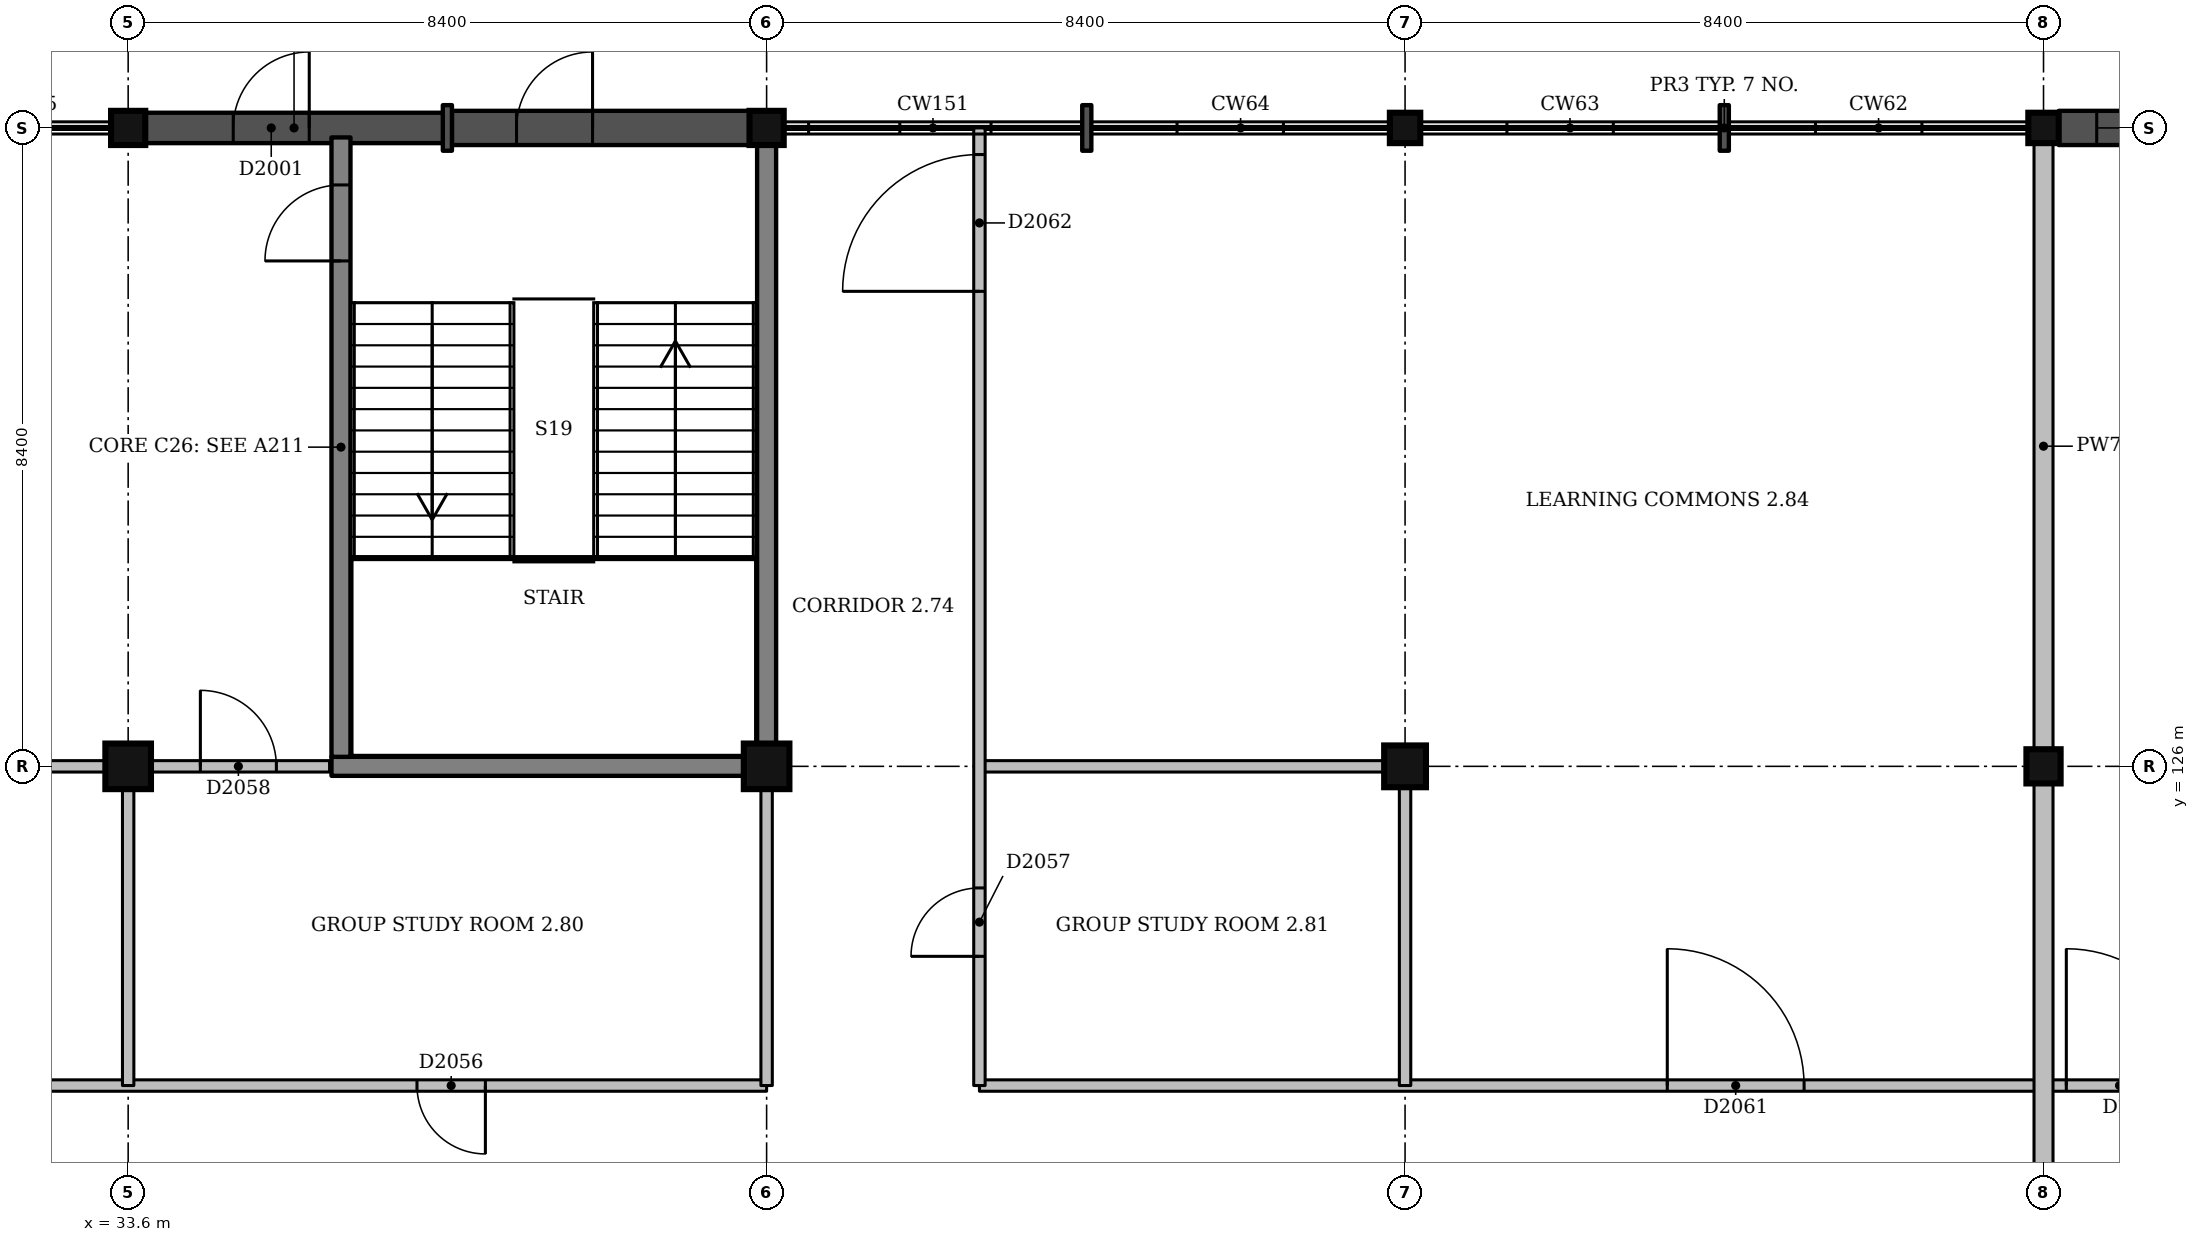
"""IFC4 building model, lengths in metres.
Left out: names, types, materials, properties, quantities, classifications, styles, units other than length and angle.
Written with IfcOpenShell. Run it as: python <this file> out.ifc"""

import sys

from ifc_helpers import new_model, si_unit, direction, frame, frame_2d, origin, origin_2d, place, context, subcontext, project, spatial, rectangle, extrude, element, fill, save


model = new_model("IFC4")
c1 = context("Model", 3, precision=1e-05, world=origin(), true_north=direction((0.0, 1.0)))
c2 = subcontext(c1, "Body", "Model", "MODEL_VIEW")
j1 = project(units=[si_unit("LENGTHUNIT", "METRE"), si_unit("PLANEANGLEUNIT", "RADIAN")], contexts=[c1])
p1 = place(None, origin())
s1 = spatial("IfcSite", under=j1, at=p1, CompositionType="ELEMENT")
p2 = place(p1, origin())
s2 = spatial("IfcBuilding", under=s1, at=p2, CompositionType="ELEMENT")
p3 = place(p2, frame((0.0, 0.0, 9.0)))
s3 = spatial("IfcBuildingStorey", under=s2, at=p3, CompositionType="ELEMENT", Elevation=9.0)
p4 = place(p3, frame((33.6, 126.0, -1.5), z_axis=(0.0, 0.0, 1.0), x_axis=(1.0, 0.0, 0.0)))
e1 = element("IfcColumn", 1, at=p4, inside=s3, PredefinedType="COLUMN", context=c2, shape_type="SweptSolid", body=[
    extrude(rectangle(XDim=0.6, YDim=0.6, at=origin_2d()), origin(), (0.0, 0.0, 1.0), 6.0),
])
p5 = place(p3, frame((33.6, 134.4, -1.5), z_axis=(0.0, 0.0, 1.0), x_axis=(1.0, 0.0, 0.0)))
e2 = element("IfcColumn", 2, at=p5, inside=s3, PredefinedType="COLUMN", context=c2, shape_type="SweptSolid", body=[
    extrude(rectangle(XDim=0.45, YDim=0.45, at=origin_2d()), origin(), (0.0, 0.0, 1.0), 6.0),
])
p6 = place(p3, frame((42.0, 126.0, -1.5), z_axis=(0.0, 0.0, 1.0), x_axis=(1.0, 0.0, 0.0)))
e3 = element("IfcColumn", 3, at=p6, inside=s3, PredefinedType="COLUMN", context=c2, shape_type="SweptSolid", body=[
    extrude(rectangle(XDim=0.6, YDim=0.6, at=origin_2d()), origin(), (0.0, 0.0, 1.0), 6.0),
])
p7 = place(p3, frame((42.0, 134.4, -1.5), z_axis=(0.0, 0.0, 1.0), x_axis=(1.0, 0.0, 0.0)))
e4 = element("IfcColumn", 4, at=p7, inside=s3, PredefinedType="COLUMN", context=c2, shape_type="SweptSolid", body=[
    extrude(rectangle(XDim=0.45, YDim=0.45, at=origin_2d()), origin(), (0.0, 0.0, 1.0), 6.0),
])
p8 = place(p3, frame((50.4, 126.0, -1.5), z_axis=(0.0, 0.0, 1.0), x_axis=(1.0, 0.0, 0.0)))
e5 = element("IfcColumn", 5, at=p8, inside=s3, PredefinedType="COLUMN", context=c2, shape_type="SweptSolid", body=[
    extrude(rectangle(XDim=0.55, YDim=0.55, at=origin_2d()), origin(), (0.0, 0.0, 1.0), 6.0),
])
p9 = place(p3, frame((50.4, 134.4, -1.5), z_axis=(0.0, 0.0, 1.0), x_axis=(1.0, 0.0, 0.0)))
e6 = element("IfcColumn", 6, at=p9, inside=s3, PredefinedType="COLUMN", context=c2, shape_type="SweptSolid", body=[
    extrude(rectangle(XDim=0.4, YDim=0.4, at=origin_2d()), origin(), (0.0, 0.0, 1.0), 6.0),
])
p10 = place(p3, frame((58.8, 126.0, -1.5), z_axis=(0.0, 0.0, 1.0), x_axis=(1.0, 0.0, 0.0)))
e7 = element("IfcColumn", 7, at=p10, inside=s3, PredefinedType="COLUMN", context=c2, shape_type="SweptSolid", body=[
    extrude(rectangle(XDim=0.45, YDim=0.45, at=origin_2d()), origin(), (0.0, 0.0, 1.0), 6.0),
])
p11 = place(p3, frame((58.8, 134.4, -1.5), z_axis=(0.0, 0.0, 1.0), x_axis=(1.0, 0.0, 0.0)))
e8 = element("IfcColumn", 8, at=p11, inside=s3, PredefinedType="COLUMN", context=c2, shape_type="SweptSolid", body=[
    extrude(rectangle(XDim=0.4, YDim=0.4, at=origin_2d()), origin(), (0.0, 0.0, 1.0), 6.0),
])
p12 = place(p3, frame((36.275, 126.0, 0.0), z_axis=(0.0, 0.0, 1.0), x_axis=(1.0, 0.0, 0.0)))
e9 = element("IfcWall", 9, at=p12, inside=s3, PredefinedType="SHEAR", context=c2, shape_type="SweptSolid", body=[
    extrude(rectangle(XDim=5.425, YDim=0.25, at=frame_2d((2.712, 0.0))), origin(), (0.0, 0.0, 1.0), 4.5),
])
p13 = place(p3, frame((36.4, 126.125, 0.0), z_axis=(0.0, 0.0, 1.0), x_axis=(0.0, 1.0, 0.0)))
e10 = element("IfcWall", 10, at=p13, inside=s3, PredefinedType="SHEAR", context=c2, shape_type="SweptSolid", body=[
    extrude(rectangle(XDim=8.15, YDim=0.25, at=frame_2d((4.075, 0.0))), origin(), (0.0, 0.0, 1.0), 4.5),
])
p14 = place(p13, frame((6.525, 0.0, 0.0)))
e11 = element("IfcOpeningElement", 11, at=p14, cuts=e10, PredefinedType="OPENING", context=c2, shape_type="SweptSolid", body=[
    extrude(rectangle(XDim=1.0, YDim=2.1, at=frame_2d((0.5, 1.05))), frame((0.0, 0.135, 0.0), z_axis=(0.0, -1.0, 0.0), x_axis=(1.0, 0.0, 0.0)), (0.0, 0.0, 1.0), 0.27),
])
p15 = place(p3, frame((42.0, 126.3, 0.0), z_axis=(0.0, 0.0, 1.0), x_axis=(0.0, 1.0, 0.0)))
e12 = element("IfcWall", 12, at=p15, inside=s3, PredefinedType="SHEAR", context=c2, shape_type="SweptSolid", body=[
    extrude(rectangle(XDim=7.875, YDim=0.25, at=frame_2d((3.938, 0.0))), origin(), (0.0, 0.0, 1.0), 4.5),
])
for number, where, z_axis, x_axis in (
    (13, (54.66, 134.4, 0.0), (0.0, 0.0, 1.0), (-1.0, 0.0, 0.0)),
    (14, (46.272, 134.4, 0.0), (0.0, 0.0, 1.0), (-1.0, 0.0, 0.0)),
):
    element("IfcWall", number, at=place(p3, frame(where, z_axis=z_axis, x_axis=x_axis)), inside=s3, PredefinedType="SOLIDWALL", context=c2, shape_type="SweptSolid", body=[
        extrude(rectangle(XDim=0.12, YDim=0.6, at=frame_2d((0.06, 0.0))), origin(), (0.0, 0.0, 1.0), 3.35),
    ])
p16 = place(p3, frame((41.775, 134.4, 0.0), z_axis=(0.0, 0.0, 1.0), x_axis=(-1.0, 0.0, 0.0)))
e15 = element("IfcWall", 15, at=p16, inside=s3, PredefinedType="SOLIDWALL", context=c2, shape_type="SweptSolid", body=[
    extrude(rectangle(XDim=3.915, YDim=0.45, at=frame_2d((1.958, 0.0))), origin(), (0.0, 0.0, 1.0), 3.35),
])
p17 = place(p16, frame((3.065, 0.0, 0.0), z_axis=(0.0, 0.0, 1.0), x_axis=(-1.0, 0.0, 0.0)))
e16 = element("IfcOpeningElement", 16, at=p17, cuts=e15, PredefinedType="OPENING", context=c2, shape_type="SweptSolid", body=[
    extrude(rectangle(XDim=1.0, YDim=2.1, at=frame_2d((0.5, 1.05))), frame((0.0, 0.235, 0.0), z_axis=(0.0, -1.0, 0.0), x_axis=(1.0, 0.0, 0.0)), (0.0, 0.0, 1.0), 0.47),
])
p18 = place(p3, frame((37.86, 134.4, 0.0), z_axis=(0.0, 0.0, 1.0), x_axis=(-1.0, 0.0, 0.0)))
e17 = element("IfcWall", 17, at=p18, inside=s3, PredefinedType="SOLIDWALL", context=c2, shape_type="SweptSolid", body=[
    extrude(rectangle(XDim=0.12, YDim=0.6, at=frame_2d((0.06, 0.0))), origin(), (0.0, 0.0, 1.0), 3.35),
])
p19 = place(p3, frame((37.74, 134.4, 0.0), z_axis=(0.0, 0.0, 1.0), x_axis=(-1.0, 0.0, 0.0)))
e18 = element("IfcWall", 18, at=p19, inside=s3, PredefinedType="SOLIDWALL", context=c2, shape_type="SweptSolid", body=[
    extrude(rectangle(XDim=3.915, YDim=0.4, at=frame_2d((1.958, 0.0))), origin(), (0.0, 0.0, 1.0), 3.35),
])
p20 = place(p19, frame((1.758, 0.0, 0.0)))
e19 = element("IfcOpeningElement", 19, at=p20, cuts=e18, PredefinedType="OPENING", context=c2, shape_type="SweptSolid", body=[
    extrude(rectangle(XDim=1.0, YDim=2.1, at=frame_2d((0.5, 1.05))), frame((0.0, 0.21, 0.0), z_axis=(0.0, -1.0, 0.0), x_axis=(1.0, 0.0, 0.0)), (0.0, 0.0, 1.0), 0.42),
])
p21 = place(p3, frame((62.7, 134.4, 0.0), z_axis=(0.0, 0.0, 1.0), x_axis=(-1.0, 0.0, 0.0)))
e20 = element("IfcWall", 20, at=p21, inside=s3, PredefinedType="SOLIDWALL", context=c2, shape_type="SweptSolid", body=[
    extrude(rectangle(XDim=3.7, YDim=0.45, at=frame_2d((1.85, 0.0))), origin(), (0.0, 0.0, 1.0), 3.45),
])
p22 = place(p21, frame((0.5, 0.0, 0.6)))
e21 = element("IfcOpeningElement", 21, at=p22, cuts=e20, PredefinedType="OPENING", context=c2, shape_type="SweptSolid", body=[
    extrude(rectangle(XDim=2.7, YDim=2.4, at=frame_2d((1.35, 1.2))), frame((0.0, 0.235, 0.0), z_axis=(0.0, -1.0, 0.0), x_axis=(1.0, 0.0, 0.0)), (0.0, 0.0, 1.0), 0.47),
])
p23 = place(p3, frame((16.8, 121.8, 0.0), z_axis=(0.0, 0.0, 1.0), x_axis=(1.0, 0.0, 0.0)))
e22 = element("IfcWall", 22, at=p23, inside=s3, PredefinedType="PARTITIONING", context=c2, shape_type="SweptSolid", body=[
    extrude(rectangle(XDim=25.2, YDim=0.15, at=frame_2d((12.6, 0.0))), origin(), (0.0, 0.0, 1.0), 3.4),
])
p24 = place(p23, frame((3.8, 0.0, 0.0)))
e23 = element("IfcOpeningElement", 23, at=p24, cuts=e22, PredefinedType="OPENING", context=c2, shape_type="SweptSolid", body=[
    extrude(rectangle(XDim=0.9, YDim=2.1, at=frame_2d((0.45, 1.05))), frame((0.0, 0.085, 0.0), z_axis=(0.0, -1.0, 0.0), x_axis=(1.0, 0.0, 0.0)), (0.0, 0.0, 1.0), 0.17),
])
p25 = place(p23, frame((12.2, 0.0, 0.0)))
e24 = element("IfcOpeningElement", 24, at=p25, cuts=e22, PredefinedType="OPENING", context=c2, shape_type="SweptSolid", body=[
    extrude(rectangle(XDim=0.9, YDim=2.1, at=frame_2d((0.45, 1.05))), frame((0.0, 0.085, 0.0), z_axis=(0.0, -1.0, 0.0), x_axis=(1.0, 0.0, 0.0)), (0.0, 0.0, 1.0), 0.17),
])
p26 = place(p23, frame((20.6, 0.0, 0.0)))
e25 = element("IfcOpeningElement", 25, at=p26, cuts=e22, PredefinedType="OPENING", context=c2, shape_type="SweptSolid", body=[
    extrude(rectangle(XDim=0.9, YDim=2.1, at=frame_2d((0.45, 1.05))), frame((0.0, 0.085, 0.0), z_axis=(0.0, -1.0, 0.0), x_axis=(1.0, 0.0, 0.0)), (0.0, 0.0, 1.0), 0.17),
])
p27 = place(p3, frame((44.8, 121.8, 0.0), z_axis=(0.0, 0.0, 1.0), x_axis=(1.0, 0.0, 0.0)))
e26 = element("IfcWall", 26, at=p27, inside=s3, PredefinedType="PARTITIONING", context=c2, shape_type="SweptSolid", body=[
    extrude(rectangle(XDim=30.0, YDim=0.15, at=frame_2d((15.0, 0.0))), origin(), (0.0, 0.0, 1.0), 3.35),
])
p28 = place(p27, frame((9.05, 0.0, 0.0)))
e27 = element("IfcOpeningElement", 27, at=p28, cuts=e26, PredefinedType="OPENING", context=c2, shape_type="SweptSolid", body=[
    extrude(rectangle(XDim=1.8, YDim=2.1, at=frame_2d((0.9, 1.05))), frame((0.0, 0.085, 0.0), z_axis=(0.0, -1.0, 0.0), x_axis=(1.0, 0.0, 0.0)), (0.0, 0.0, 1.0), 0.17),
])
p29 = place(p27, frame((14.3, 0.0, 0.0)))
e28 = element("IfcOpeningElement", 28, at=p29, cuts=e26, PredefinedType="OPENING", context=c2, shape_type="SweptSolid", body=[
    extrude(rectangle(XDim=1.8, YDim=2.1, at=frame_2d((0.9, 1.05))), frame((0.0, 0.085, 0.0), z_axis=(0.0, -1.0, 0.0), x_axis=(1.0, 0.0, 0.0)), (0.0, 0.0, 1.0), 0.17),
])
p30 = place(p3, frame((25.5, 126.0, 0.0), z_axis=(0.0, 0.0, 1.0), x_axis=(1.0, 0.0, 0.0)))
e29 = element("IfcWall", 29, at=p30, inside=s3, PredefinedType="PARTITIONING", context=c2, shape_type="SweptSolid", body=[
    extrude(rectangle(XDim=7.8, YDim=0.15, at=frame_2d((3.9, 0.0))), origin(), (0.0, 0.0, 1.0), 3.4),
])
p31 = place(p3, frame((33.9, 126.0, 0.0), z_axis=(0.0, 0.0, 1.0), x_axis=(1.0, 0.0, 0.0)))
e30 = element("IfcWall", 30, at=p31, inside=s3, PredefinedType="PARTITIONING", context=c2, shape_type="SweptSolid", body=[
    extrude(rectangle(XDim=2.35, YDim=0.15, at=frame_2d((1.175, 0.0))), origin(), (0.0, 0.0, 1.0), 3.4),
])
p32 = place(p31, frame((0.65, 0.0, 0.0)))
e31 = element("IfcOpeningElement", 31, at=p32, cuts=e30, PredefinedType="OPENING", context=c2, shape_type="SweptSolid", body=[
    extrude(rectangle(XDim=1.0, YDim=2.1, at=frame_2d((0.5, 1.05))), frame((0.0, 0.085, 0.0), z_axis=(0.0, -1.0, 0.0), x_axis=(1.0, 0.0, 0.0)), (0.0, 0.0, 1.0), 0.17),
])
p33 = place(p3, frame((44.8, 126.0, 0.0), z_axis=(0.0, 0.0, 1.0), x_axis=(1.0, 0.0, 0.0)))
e32 = element("IfcWall", 32, at=p33, inside=s3, PredefinedType="PARTITIONING", context=c2, shape_type="SweptSolid", body=[
    extrude(rectangle(XDim=5.325, YDim=0.15, at=frame_2d((2.663, 0.0))), origin(), (0.0, 0.0, 1.0), 3.4),
])
p34 = place(p3, frame((33.6, 121.8, 0.0), z_axis=(0.0, 0.0, 1.0), x_axis=(0.0, 1.0, 0.0)))
e33 = element("IfcWall", 33, at=p34, inside=s3, PredefinedType="PARTITIONING", context=c2, shape_type="SweptSolid", body=[
    extrude(rectangle(XDim=3.9, YDim=0.15, at=frame_2d((1.95, 0.0))), origin(), (0.0, 0.0, 1.0), 4.15),
])
p35 = place(p3, frame((42.0, 121.8, 0.0), z_axis=(0.0, 0.0, 1.0), x_axis=(0.0, 1.0, 0.0)))
e34 = element("IfcWall", 34, at=p35, inside=s3, PredefinedType="PARTITIONING", context=c2, shape_type="SweptSolid", body=[
    extrude(rectangle(XDim=3.9, YDim=0.15, at=frame_2d((1.95, 0.0))), origin(), (0.0, 0.0, 1.0), 3.4),
])
p36 = place(p3, frame((44.8, 121.8, 0.0), z_axis=(0.0, 0.0, 1.0), x_axis=(0.0, 1.0, 0.0)))
e35 = element("IfcWall", 35, at=p36, inside=s3, PredefinedType="PARTITIONING", context=c2, shape_type="SweptSolid", body=[
    extrude(rectangle(XDim=12.6, YDim=0.15, at=frame_2d((6.3, 0.0))), origin(), (0.0, 0.0, 1.0), 3.27),
])
p37 = place(p36, frame((1.7, 0.0, 0.0)))
e36 = element("IfcOpeningElement", 36, at=p37, cuts=e35, PredefinedType="OPENING", context=c2, shape_type="SweptSolid", body=[
    extrude(rectangle(XDim=0.9, YDim=2.1, at=frame_2d((0.45, 1.05))), frame((0.0, 0.085, 0.0), z_axis=(0.0, -1.0, 0.0), x_axis=(1.0, 0.0, 0.0)), (0.0, 0.0, 1.0), 0.17),
])
p38 = place(p36, frame((10.45, 0.0, 0.0)))
e37 = element("IfcOpeningElement", 37, at=p38, cuts=e35, PredefinedType="OPENING", context=c2, shape_type="SweptSolid", body=[
    extrude(rectangle(XDim=1.8, YDim=2.1, at=frame_2d((0.9, 1.05))), frame((0.0, 0.085, 0.0), z_axis=(0.0, -1.0, 0.0), x_axis=(1.0, 0.0, 0.0)), (0.0, 0.0, 1.0), 0.17),
])
p39 = place(p3, frame((50.4, 121.8, 0.0), z_axis=(0.0, 0.0, 1.0), x_axis=(0.0, 1.0, 0.0)))
e38 = element("IfcWall", 38, at=p39, inside=s3, PredefinedType="PARTITIONING", context=c2, shape_type="SweptSolid", body=[
    extrude(rectangle(XDim=3.925, YDim=0.15, at=frame_2d((1.962, 0.0))), origin(), (0.0, 0.0, 1.0), 3.4),
])
p40 = place(p3, frame((58.8, 117.825, 0.0), z_axis=(0.0, 0.0, 1.0), x_axis=(0.0, 1.0, 0.0)))
e39 = element("IfcWall", 39, at=p40, inside=s3, PredefinedType="SOLIDWALL", context=c2, shape_type="SweptSolid", body=[
    extrude(rectangle(XDim=7.95, YDim=0.25, at=frame_2d((3.975, 0.0))), origin(), (0.0, 0.0, 1.0), 3.35),
])
p41 = place(p40, frame((1.0, 0.0, 0.0)))
e40 = element("IfcOpeningElement", 40, at=p41, cuts=e39, PredefinedType="OPENING", context=c2, shape_type="SweptSolid", body=[
    extrude(rectangle(XDim=1.8, YDim=2.1, at=frame_2d((0.9, 1.05))), frame((0.0, 0.135, 0.0), z_axis=(0.0, -1.0, 0.0), x_axis=(1.0, 0.0, 0.0)), (0.0, 0.0, 1.0), 0.27),
])
p42 = place(p3, frame((58.8, 126.225, 0.0), z_axis=(0.0, 0.0, 1.0), x_axis=(0.0, 1.0, 0.0)))
e41 = element("IfcWall", 41, at=p42, inside=s3, PredefinedType="SOLIDWALL", context=c2, shape_type="SweptSolid", body=[
    extrude(rectangle(XDim=7.975, YDim=0.25, at=frame_2d((3.987, 0.0))), origin(), (0.0, 0.0, 1.0), 3.35),
])
p43 = place(p20, origin())
e42 = element("IfcDoor", 42, at=p43, inside=s3, OperationType="SINGLE_SWING_LEFT", PredefinedType="DOOR", context=c2, shape_type="SweptSolid", body=[
    extrude(rectangle(XDim=1.0, YDim=2.1, at=frame_2d((0.5, 1.05))), frame((0.0, 0.025, 0.0), z_axis=(0.0, -1.0, 0.0), x_axis=(1.0, 0.0, 0.0)), (0.0, 0.0, 1.0), 0.05),
])
fill(e19, e42)
p44 = place(p22, origin())
e43 = element("IfcWindow", 43, at=p44, inside=s3, PartitioningType="SINGLE_PANEL", PredefinedType="WINDOW", context=c2, shape_type="SweptSolid", body=[
    extrude(rectangle(XDim=2.7, YDim=2.4, at=frame_2d((1.35, 1.2))), frame((0.0, 0.135, 0.0), z_axis=(0.0, -1.0, 0.0), x_axis=(1.0, 0.0, 0.0)), (0.0, 0.0, 1.0), 0.06),
])
fill(e21, e43)
p45 = place(p26, origin())
e44 = element("IfcDoor", 44, at=p45, inside=s3, OperationType="SINGLE_SWING_RIGHT", PredefinedType="DOOR", context=c2, shape_type="SweptSolid", body=[
    extrude(rectangle(XDim=0.9, YDim=2.1, at=frame_2d((0.45, 1.05))), frame((0.0, 0.025, 0.0), z_axis=(0.0, -1.0, 0.0), x_axis=(1.0, 0.0, 0.0)), (0.0, 0.0, 1.0), 0.05),
])
fill(e25, e44)
p46 = place(p37, origin())
e45 = element("IfcDoor", 45, at=p46, inside=s3, OperationType="SINGLE_SWING_LEFT", PredefinedType="DOOR", context=c2, shape_type="SweptSolid", body=[
    extrude(rectangle(XDim=0.9, YDim=2.1, at=frame_2d((0.45, 1.05))), frame((0.0, 0.025, 0.0), z_axis=(0.0, -1.0, 0.0), x_axis=(1.0, 0.0, 0.0)), (0.0, 0.0, 1.0), 0.05),
])
fill(e36, e45)
p47 = place(p32, origin())
e46 = element("IfcDoor", 46, at=p47, inside=s3, OperationType="SINGLE_SWING_LEFT", PredefinedType="DOOR", context=c2, shape_type="SweptSolid", body=[
    extrude(rectangle(XDim=1.0, YDim=2.1, at=frame_2d((0.5, 1.05))), frame((0.0, 0.025, 0.0), z_axis=(0.0, -1.0, 0.0), x_axis=(1.0, 0.0, 0.0)), (0.0, 0.0, 1.0), 0.05),
])
fill(e31, e46)
p48 = place(p28, origin())
e47 = element("IfcDoor", 47, at=p48, inside=s3, OperationType="DOUBLE_DOOR_SINGLE_SWING", PredefinedType="DOOR", context=c2, shape_type="SweptSolid", body=[
    extrude(rectangle(XDim=1.8, YDim=2.1, at=frame_2d((0.9, 1.05))), frame((0.0, 0.025, 0.0), z_axis=(0.0, -1.0, 0.0), x_axis=(1.0, 0.0, 0.0)), (0.0, 0.0, 1.0), 0.05),
])
fill(e27, e47)
p49 = place(p38, origin())
e48 = element("IfcDoor", 48, at=p49, inside=s3, OperationType="DOUBLE_DOOR_SINGLE_SWING", PredefinedType="DOOR", context=c2, shape_type="SweptSolid", body=[
    extrude(rectangle(XDim=1.8, YDim=2.1, at=frame_2d((0.9, 1.05))), frame((0.0, 0.025, 0.0), z_axis=(0.0, -1.0, 0.0), x_axis=(1.0, 0.0, 0.0)), (0.0, 0.0, 1.0), 0.05),
])
fill(e37, e48)
p50 = place(p29, origin())
e49 = element("IfcDoor", 49, at=p50, inside=s3, OperationType="DOUBLE_DOOR_SINGLE_SWING", PredefinedType="DOOR", context=c2, shape_type="SweptSolid", body=[
    extrude(rectangle(XDim=1.8, YDim=2.1, at=frame_2d((0.9, 1.05))), frame((0.0, 0.025, 0.0), z_axis=(0.0, -1.0, 0.0), x_axis=(1.0, 0.0, 0.0)), (0.0, 0.0, 1.0), 0.05),
])
fill(e28, e49)
p51 = place(p14, origin())
e50 = element("IfcDoor", 50, at=p51, inside=s3, OperationType="SINGLE_SWING_LEFT", PredefinedType="DOOR", context=c2, shape_type="SweptSolid", body=[
    extrude(rectangle(XDim=1.0, YDim=2.1, at=frame_2d((0.5, 1.05))), frame((0.0, 0.025, 0.0), z_axis=(0.0, -1.0, 0.0), x_axis=(1.0, 0.0, 0.0)), (0.0, 0.0, 1.0), 0.05),
])
fill(e11, e50)
p52 = place(p17, origin())
e51 = element("IfcDoor", 51, at=p52, inside=s3, OperationType="SINGLE_SWING_LEFT", PredefinedType="DOOR", context=c2, shape_type="SweptSolid", body=[
    extrude(rectangle(XDim=1.0, YDim=2.1, at=frame_2d((0.5, 1.05))), frame((0.0, 0.025, 0.0), z_axis=(0.0, -1.0, 0.0), x_axis=(1.0, 0.0, 0.0)), (0.0, 0.0, 1.0), 0.05),
])
fill(e16, e51)
save(model, sys.argv[1])
